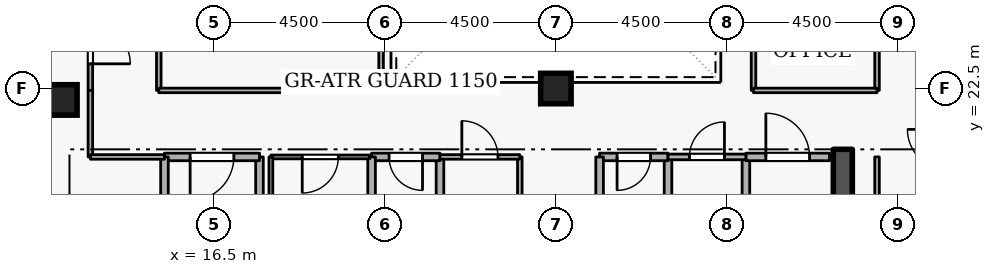
"""IFC4 building model, lengths in metres.
Left out: names, types, materials, properties, quantities, classifications, styles, units other than length and angle.
Written with IfcOpenShell. Run it as: python <this file> out.ifc"""

import sys

from ifc_helpers import new_model, si_unit, direction, frame, frame_2d, origin, origin_2d, place, context, subcontext, project, spatial, rectangle, extrude, element, fill, save


model = new_model("IFC4")
c1 = context("Model", 3, precision=1e-05, world=origin(), true_north=direction((0.0, 1.0)))
c2 = subcontext(c1, "Body", "Model", "MODEL_VIEW")
j1 = project(units=[si_unit("LENGTHUNIT", "METRE"), si_unit("PLANEANGLEUNIT", "RADIAN")], contexts=[c1])
p1 = place(None, origin())
s1 = spatial("IfcSite", under=j1, at=p1, CompositionType="ELEMENT")
p2 = place(p1, origin())
s2 = spatial("IfcBuilding", under=s1, at=p2, CompositionType="ELEMENT")
p3 = place(p2, frame((0.0, 0.0, 261.9)))
s3 = spatial("IfcBuildingStorey", under=s2, at=p3, CompositionType="ELEMENT", Elevation=261.9)
p4 = place(p3, frame((33.05, 15.1, 0.0), z_axis=(0.0, 0.0, 1.0), x_axis=(0.0, 1.0, 0.0)))
e1 = element("IfcWall", 1, at=p4, inside=s3, PredefinedType="SHEAR", context=c2, shape_type="SweptSolid", body=[
    extrude(rectangle(XDim=5.8, YDim=0.5, at=frame_2d((2.9, 0.0))), origin(), (0.0, 0.0, 1.0), 3.6),
])
for number, where, z_axis, x_axis in (
    (2, (12.5, 22.2, 0.0), (0.0, 0.0, 1.0), (1.0, 0.0, 0.0)),
    (3, (25.5, 22.5, 0.0), (0.0, 0.0, 1.0), (1.0, 0.0, 0.0)),
):
    element("IfcColumn", number, at=place(p3, frame(where, z_axis=z_axis, x_axis=x_axis)), inside=s3, PredefinedType="COLUMN", context=c2, shape_type="SweptSolid", body=[
        extrude(rectangle(XDim=0.8, YDim=0.8, at=origin_2d()), origin(), (0.0, 0.0, 1.0), 3.6),
    ])
p5 = place(p3, frame((17.7, 18.4, 0.0), z_axis=(0.0, 0.0, 1.0), x_axis=(0.0, 1.0, 0.0)))
e4 = element("IfcWall", 4, at=p5, inside=s3, PredefinedType="STANDARD", context=c2, shape_type="SweptSolid", body=[
    extrude(rectangle(XDim=2.3, YDim=0.2, at=frame_2d((1.15, 0.0))), origin(), (0.0, 0.0, 1.0), 2.545),
])
p6 = place(p3, frame((17.7, 20.7, 0.0), z_axis=(0.0, 0.0, 1.0), x_axis=(-1.0, 0.0, 0.0)))
e5 = element("IfcWall", 5, at=p6, inside=s3, PredefinedType="STANDARD", context=c2, shape_type="SweptSolid", body=[
    extrude(rectangle(XDim=2.5, YDim=0.2, at=frame_2d((1.25, 0.0))), origin(), (0.0, 0.0, 1.0), 3.34),
])
p7 = place(p6, frame((0.675, 0.0, 0.0)))
e6 = element("IfcOpeningElement", 6, at=p7, cuts=e5, PredefinedType="OPENING", context=c2, shape_type="SweptSolid", body=[
    extrude(rectangle(XDim=1.15, YDim=2.1, at=frame_2d((0.575, 1.05))), frame((0.0, 0.11, 0.0), z_axis=(0.0, -1.0, 0.0), x_axis=(1.0, 0.0, 0.0)), (0.0, 0.0, 1.0), 0.22),
])
p8 = place(p3, frame((15.2, 20.7, 0.0), z_axis=(0.0, 0.0, 1.0), x_axis=(0.0, -1.0, 0.0)))
e7 = element("IfcWall", 7, at=p8, inside=s3, PredefinedType="STANDARD", context=c2, shape_type="SweptSolid", body=[
    extrude(rectangle(XDim=5.7, YDim=0.2, at=frame_2d((2.85, 0.0))), origin(), (0.0, 0.0, 1.0), 3.34),
])
p9 = place(p3, frame((28.45, 18.65, 0.0), z_axis=(0.0, 0.0, 1.0), x_axis=(0.0, 1.0, 0.0)))
e8 = element("IfcWall", 8, at=p9, inside=s3, PredefinedType="STANDARD", context=c2, shape_type="SweptSolid", body=[
    extrude(rectangle(XDim=2.05, YDim=0.2, at=frame_2d((1.025, 0.0))), origin(), (0.0, 0.0, 1.0), 3.34),
])
p10 = place(p3, frame((28.45, 20.7, 0.0), z_axis=(0.0, 0.0, 1.0), x_axis=(-1.0, 0.0, 0.0)))
e9 = element("IfcWall", 9, at=p10, inside=s3, PredefinedType="STANDARD", context=c2, shape_type="SweptSolid", body=[
    extrude(rectangle(XDim=1.8, YDim=0.2, at=frame_2d((0.9, 0.0))), origin(), (0.0, 0.0, 1.0), 3.34),
])
p11 = place(p10, frame((0.46, 0.0, 0.0)))
e10 = element("IfcOpeningElement", 10, at=p11, cuts=e9, PredefinedType="OPENING", context=c2, shape_type="SweptSolid", body=[
    extrude(rectangle(XDim=0.88, YDim=2.04, at=frame_2d((0.44, 1.02))), frame((0.0, 0.11, 0.0), z_axis=(0.0, -1.0, 0.0), x_axis=(1.0, 0.0, 0.0)), (0.0, 0.0, 1.0), 0.22),
])
for number, where, z_axis, x_axis in (
    (11, (26.65, 20.7, 0.0), (0.0, 0.0, 1.0), (0.0, -1.0, 0.0)),
    (12, (22.45, 18.65, 0.0), (0.0, 0.0, 1.0), (0.0, 1.0, 0.0)),
):
    element("IfcWall", number, at=place(p3, frame(where, z_axis=z_axis, x_axis=x_axis)), inside=s3, PredefinedType="STANDARD", context=c2, shape_type="SweptSolid", body=[
        extrude(rectangle(XDim=2.05, YDim=0.2, at=frame_2d((1.025, 0.0))), origin(), (0.0, 0.0, 1.0), 3.34),
    ])
p12 = place(p3, frame((22.45, 20.7, 0.0), z_axis=(0.0, 0.0, 1.0), x_axis=(-1.0, 0.0, 0.0)))
e13 = element("IfcWall", 13, at=p12, inside=s3, PredefinedType="STANDARD", context=c2, shape_type="SweptSolid", body=[
    extrude(rectangle(XDim=1.8, YDim=0.2, at=frame_2d((0.9, 0.0))), origin(), (0.0, 0.0, 1.0), 3.34),
])
p13 = place(p12, frame((0.46, 0.0, 0.0)))
e14 = element("IfcOpeningElement", 14, at=p13, cuts=e13, PredefinedType="OPENING", context=c2, shape_type="SweptSolid", body=[
    extrude(rectangle(XDim=0.88, YDim=2.04, at=frame_2d((0.44, 1.02))), frame((0.0, 0.11, 0.0), z_axis=(0.0, -1.0, 0.0), x_axis=(1.0, 0.0, 0.0)), (0.0, 0.0, 1.0), 0.22),
])
for number, where, z_axis, x_axis in (
    (15, (20.65, 20.7, 0.0), (0.0, 0.0, 1.0), (0.0, -1.0, 0.0)),
    (16, (30.5, 18.65, 0.0), (0.0, 0.0, 1.0), (0.0, 1.0, 0.0)),
):
    element("IfcWall", number, at=place(p3, frame(where, z_axis=z_axis, x_axis=x_axis)), inside=s3, PredefinedType="STANDARD", context=c2, shape_type="SweptSolid", body=[
        extrude(rectangle(XDim=2.05, YDim=0.2, at=frame_2d((1.025, 0.0))), origin(), (0.0, 0.0, 1.0), 3.34),
    ])
p14 = place(p3, frame((30.5, 20.7, 0.0), z_axis=(0.0, 0.0, 1.0), x_axis=(1.0, 0.0, 0.0)))
e17 = element("IfcWall", 17, at=p14, inside=s3, PredefinedType="STANDARD", context=c2, shape_type="SweptSolid", body=[
    extrude(rectangle(XDim=2.2, YDim=0.2, at=frame_2d((1.1, 0.0))), origin(), (0.0, 0.0, 1.0), 3.34),
])
p15 = place(p14, frame((0.525, 0.0, 0.0)))
e18 = element("IfcOpeningElement", 18, at=p15, cuts=e17, PredefinedType="OPENING", context=c2, shape_type="SweptSolid", body=[
    extrude(rectangle(XDim=1.15, YDim=2.1, at=frame_2d((0.575, 1.05))), frame((0.0, 0.11, 0.0), z_axis=(0.0, -1.0, 0.0), x_axis=(1.0, 0.0, 0.0)), (0.0, 0.0, 1.0), 0.22),
])
p16 = place(p3, frame((20.6, 20.7, 0.0), z_axis=(0.0, 0.0, 1.0), x_axis=(-1.0, 0.0, 0.0)))
e19 = element("IfcWall", 19, at=p16, inside=s3, PredefinedType="PARTITIONING", context=c2, shape_type="SweptSolid", body=[
    extrude(rectangle(XDim=2.6, YDim=0.1, at=frame_2d((1.3, 0.0))), origin(), (0.0, 0.0, 1.0), 3.34),
])
p17 = place(p16, frame((0.825, 0.0, 0.0)))
e20 = element("IfcOpeningElement", 20, at=p17, cuts=e19, PredefinedType="OPENING", context=c2, shape_type="SweptSolid", body=[
    extrude(rectangle(XDim=0.95, YDim=2.1, at=frame_2d((0.475, 1.05))), frame((0.0, 0.06, 0.0), z_axis=(0.0, -1.0, 0.0), x_axis=(1.0, 0.0, 0.0)), (0.0, 0.0, 1.0), 0.12),
])
p18 = place(p3, frame((18.0, 20.7, 0.0), z_axis=(0.0, 0.0, 1.0), x_axis=(0.0, -1.0, 0.0)))
e21 = element("IfcWall", 21, at=p18, inside=s3, PredefinedType="PARTITIONING", context=c2, shape_type="SweptSolid", body=[
    extrude(rectangle(XDim=2.05, YDim=0.1, at=frame_2d((1.025, 0.0))), origin(), (0.0, 0.0, 1.0), 2.545),
])
p19 = place(p3, frame((24.55, 20.7, 0.0), z_axis=(0.0, 0.0, 1.0), x_axis=(0.0, -1.0, 0.0)))
e22 = element("IfcWall", 22, at=p19, inside=s3, PredefinedType="PARTITIONING", context=c2, shape_type="SweptSolid", body=[
    extrude(rectangle(XDim=2.05, YDim=0.12, at=frame_2d((1.025, 0.0))), origin(), (0.0, 0.0, 1.0), 3.34),
])
p20 = place(p3, frame((22.45, 20.7, 0.0), z_axis=(0.0, 0.0, 1.0), x_axis=(1.0, 0.0, 0.0)))
e23 = element("IfcWall", 23, at=p20, inside=s3, PredefinedType="PARTITIONING", context=c2, shape_type="SweptSolid", body=[
    extrude(rectangle(XDim=2.1, YDim=0.12, at=frame_2d((1.05, 0.0))), origin(), (0.0, 0.0, 1.0), 3.34),
])
p21 = place(p20, frame((0.575, 0.0, 0.0)))
e24 = element("IfcOpeningElement", 24, at=p21, cuts=e23, PredefinedType="OPENING", context=c2, shape_type="SweptSolid", body=[
    extrude(rectangle(XDim=0.95, YDim=2.1, at=frame_2d((0.475, 1.05))), frame((0.0, 0.07, 0.0), z_axis=(0.0, -1.0, 0.0), x_axis=(1.0, 0.0, 0.0)), (0.0, 0.0, 1.0), 0.14),
])
p22 = place(p3, frame((28.45, 20.7, 0.0), z_axis=(0.0, 0.0, 1.0), x_axis=(1.0, 0.0, 0.0)))
e25 = element("IfcWall", 25, at=p22, inside=s3, PredefinedType="PARTITIONING", context=c2, shape_type="SweptSolid", body=[
    extrude(rectangle(XDim=2.05, YDim=0.15, at=frame_2d((1.025, 0.0))), origin(), (0.0, 0.0, 1.0), 3.34),
])
p23 = place(p22, frame((0.565, 0.0, 0.0)))
e26 = element("IfcOpeningElement", 26, at=p23, cuts=e25, PredefinedType="OPENING", context=c2, shape_type="SweptSolid", body=[
    extrude(rectangle(XDim=0.92, YDim=2.08, at=frame_2d((0.46, 1.04))), frame((0.0, 0.085, 0.0), z_axis=(0.0, -1.0, 0.0), x_axis=(1.0, 0.0, 0.0)), (0.0, 0.0, 1.0), 0.17),
])
p24 = place(p3, frame((33.95, 20.7, 0.0), z_axis=(0.0, 0.0, 1.0), x_axis=(0.0, -1.0, 0.0)))
e27 = element("IfcWall", 27, at=p24, inside=s3, PredefinedType="PARTITIONING", context=c2, shape_type="SweptSolid", body=[
    extrude(rectangle(XDim=5.9, YDim=0.12, at=frame_2d((2.95, 0.0))), origin(), (0.0, 0.0, 1.0), 3.34),
])
p25 = place(p3, frame((13.25, 24.9, 0.0), z_axis=(0.0, 0.0, 1.0), x_axis=(0.0, -1.0, 0.0)))
e28 = element("IfcWall", 28, at=p25, inside=s3, PredefinedType="PARTITIONING", context=c2, shape_type="SweptSolid", body=[
    extrude(rectangle(XDim=2.45, YDim=0.12, at=frame_2d((1.225, 0.0))), origin(), (0.0, 0.0, 1.0), 3.34),
])
p26 = place(p25, frame((0.7, 0.0, 0.0)))
e29 = element("IfcOpeningElement", 29, at=p26, cuts=e28, PredefinedType="OPENING", context=c2, shape_type="SweptSolid", body=[
    extrude(rectangle(XDim=1.05, YDim=2.1, at=frame_2d((0.525, 1.05))), frame((0.0, 0.07, 0.0), z_axis=(0.0, -1.0, 0.0), x_axis=(1.0, 0.0, 0.0)), (0.0, 0.0, 1.0), 0.14),
])
p27 = place(p3, frame((13.25, 22.45, 0.0), z_axis=(0.0, 0.0, 1.0), x_axis=(0.0, -1.0, 0.0)))
e30 = element("IfcWall", 30, at=p27, inside=s3, PredefinedType="PARTITIONING", context=c2, shape_type="SweptSolid", body=[
    extrude(rectangle(XDim=1.75, YDim=0.12, at=frame_2d((0.875, 0.0))), origin(), (0.0, 0.0, 1.0), 3.34),
])
p28 = place(p3, frame((13.25, 20.7, 0.0), z_axis=(0.0, 0.0, 1.0), x_axis=(1.0, 0.0, 0.0)))
e31 = element("IfcWall", 31, at=p28, inside=s3, PredefinedType="PARTITIONING", context=c2, shape_type="SweptSolid", body=[
    extrude(rectangle(XDim=1.95, YDim=0.12, at=frame_2d((0.975, 0.0))), origin(), (0.0, 0.0, 1.0), 3.34),
])
p29 = place(p3, frame((15.05, 22.45, 0.0), z_axis=(0.0, 0.0, 1.0), x_axis=(0.0, 1.0, 0.0)))
e32 = element("IfcWall", 32, at=p29, inside=s3, PredefinedType="PARTITIONING", context=c2, shape_type="SweptSolid", body=[
    extrude(rectangle(XDim=9.1, YDim=0.12, at=frame_2d((4.55, 0.0))), origin(), (0.0, 0.0, 1.0), 3.34),
])
p30 = place(p29, frame((4.075, 0.0, 0.0)))
e33 = element("IfcOpeningElement", 33, at=p30, cuts=e32, PredefinedType="OPENING", context=c2, shape_type="SweptSolid", body=[
    extrude(rectangle(XDim=0.95, YDim=2.1, at=frame_2d((0.475, 1.05))), frame((0.0, 0.07, 0.0), z_axis=(0.0, -1.0, 0.0), x_axis=(1.0, 0.0, 0.0)), (0.0, 0.0, 1.0), 0.14),
])
p31 = place(p3, frame((20.9, 31.55, 0.0), z_axis=(0.0, 0.0, 1.0), x_axis=(0.0, -1.0, 0.0)))
e34 = element("IfcWall", 34, at=p31, inside=s3, PredefinedType="PARTITIONING", context=c2, shape_type="SweptSolid", body=[
    extrude(rectangle(XDim=9.1, YDim=0.12, at=frame_2d((4.55, 0.0))), origin(), (0.0, 0.0, 1.0), 3.34),
])
p32 = place(p3, frame((20.9, 22.45, 0.0), z_axis=(0.0, 0.0, 1.0), x_axis=(-1.0, 0.0, 0.0)))
e35 = element("IfcWall", 35, at=p32, inside=s3, PredefinedType="PARTITIONING", context=c2, shape_type="SweptSolid", body=[
    extrude(rectangle(XDim=5.85, YDim=0.12, at=frame_2d((2.925, 0.0))), origin(), (0.0, 0.0, 1.0), 3.34),
])
p33 = place(p3, frame((30.7, 22.45, 0.0), z_axis=(0.0, 0.0, 1.0), x_axis=(0.0, 1.0, 0.0)))
e36 = element("IfcWall", 36, at=p33, inside=s3, PredefinedType="PARTITIONING", context=c2, shape_type="SweptSolid", body=[
    extrude(rectangle(XDim=9.1, YDim=0.12, at=frame_2d((4.55, 0.0))), origin(), (0.0, 0.0, 1.0), 3.34),
])
p34 = place(p3, frame((33.95, 31.55, 0.0), z_axis=(0.0, 0.0, 1.0), x_axis=(0.0, -1.0, 0.0)))
e37 = element("IfcWall", 37, at=p34, inside=s3, PredefinedType="PARTITIONING", context=c2, shape_type="SweptSolid", body=[
    extrude(rectangle(XDim=9.1, YDim=0.12, at=frame_2d((4.55, 0.0))), origin(), (0.0, 0.0, 1.0), 3.34),
])
p35 = place(p34, frame((4.075, 0.0, 0.0)))
e38 = element("IfcOpeningElement", 38, at=p35, cuts=e37, PredefinedType="OPENING", context=c2, shape_type="SweptSolid", body=[
    extrude(rectangle(XDim=0.95, YDim=2.1, at=frame_2d((0.475, 1.05))), frame((0.0, 0.07, 0.0), z_axis=(0.0, -1.0, 0.0), x_axis=(1.0, 0.0, 0.0)), (0.0, 0.0, 1.0), 0.14),
])
p36 = place(p3, frame((33.95, 22.45, 0.0), z_axis=(0.0, 0.0, 1.0), x_axis=(-1.0, 0.0, 0.0)))
e39 = element("IfcWall", 39, at=p36, inside=s3, PredefinedType="PARTITIONING", context=c2, shape_type="SweptSolid", body=[
    extrude(rectangle(XDim=3.25, YDim=0.12, at=frame_2d((1.625, 0.0))), origin(), (0.0, 0.0, 1.0), 3.34),
])
p37 = place(p7, origin())
e40 = element("IfcDoor", 40, at=p37, inside=s3, OperationType="SINGLE_SWING_RIGHT", PredefinedType="DOOR", context=c2, shape_type="SweptSolid", body=[
    extrude(rectangle(XDim=1.15, YDim=2.1, at=frame_2d((0.575, 1.05))), frame((0.0, 0.025, 0.0), z_axis=(0.0, -1.0, 0.0), x_axis=(1.0, 0.0, 0.0)), (0.0, 0.0, 1.0), 0.05),
])
fill(e6, e40)
p38 = place(p11, origin())
e41 = element("IfcDoor", 41, at=p38, inside=s3, OperationType="SINGLE_SWING_RIGHT", PredefinedType="DOOR", context=c2, shape_type="SweptSolid", body=[
    extrude(rectangle(XDim=0.88, YDim=2.04, at=frame_2d((0.44, 1.02))), frame((0.0, 0.025, 0.0), z_axis=(0.0, -1.0, 0.0), x_axis=(1.0, 0.0, 0.0)), (0.0, 0.0, 1.0), 0.05),
])
fill(e10, e41)
p39 = place(p13, origin())
e42 = element("IfcDoor", 42, at=p39, inside=s3, OperationType="SINGLE_SWING_LEFT", PredefinedType="DOOR", context=c2, shape_type="SweptSolid", body=[
    extrude(rectangle(XDim=0.88, YDim=2.04, at=frame_2d((0.44, 1.02))), frame((0.0, 0.025, 0.0), z_axis=(0.0, -1.0, 0.0), x_axis=(1.0, 0.0, 0.0)), (0.0, 0.0, 1.0), 0.05),
])
fill(e14, e42)
p40 = place(p17, origin())
e43 = element("IfcDoor", 43, at=p40, inside=s3, OperationType="SINGLE_SWING_RIGHT", PredefinedType="DOOR", context=c2, shape_type="SweptSolid", body=[
    extrude(rectangle(XDim=0.95, YDim=2.1, at=frame_2d((0.475, 1.05))), frame((0.0, 0.025, 0.0), z_axis=(0.0, -1.0, 0.0), x_axis=(1.0, 0.0, 0.0)), (0.0, 0.0, 1.0), 0.05),
])
fill(e20, e43)
p41 = place(p21, origin())
e44 = element("IfcDoor", 44, at=p41, inside=s3, OperationType="SINGLE_SWING_LEFT", PredefinedType="DOOR", context=c2, shape_type="SweptSolid", body=[
    extrude(rectangle(XDim=0.95, YDim=2.1, at=frame_2d((0.475, 1.05))), frame((0.0, 0.025, 0.0), z_axis=(0.0, -1.0, 0.0), x_axis=(1.0, 0.0, 0.0)), (0.0, 0.0, 1.0), 0.05),
])
fill(e24, e44)
p42 = place(p23, origin())
e45 = element("IfcDoor", 45, at=p42, inside=s3, OperationType="SINGLE_SWING_RIGHT", PredefinedType="DOOR", context=c2, shape_type="SweptSolid", body=[
    extrude(rectangle(XDim=0.92, YDim=2.08, at=frame_2d((0.46, 1.04))), frame((0.0, 0.025, 0.0), z_axis=(0.0, -1.0, 0.0), x_axis=(1.0, 0.0, 0.0)), (0.0, 0.0, 1.0), 0.05),
])
fill(e26, e45)
p43 = place(p15, origin())
e46 = element("IfcDoor", 46, at=p43, inside=s3, OperationType="SINGLE_SWING_LEFT", PredefinedType="DOOR", context=c2, shape_type="SweptSolid", body=[
    extrude(rectangle(XDim=1.15, YDim=2.1, at=frame_2d((0.575, 1.05))), frame((0.0, 0.025, 0.0), z_axis=(0.0, -1.0, 0.0), x_axis=(1.0, 0.0, 0.0)), (0.0, 0.0, 1.0), 0.05),
])
fill(e18, e46)
p44 = place(p26, origin())
e47 = element("IfcDoor", 47, at=p44, inside=s3, OperationType="SINGLE_SWING_RIGHT", PredefinedType="DOOR", context=c2, shape_type="SweptSolid", body=[
    extrude(rectangle(XDim=1.05, YDim=2.1, at=frame_2d((0.525, 1.05))), frame((0.0, 0.025, 0.0), z_axis=(0.0, -1.0, 0.0), x_axis=(1.0, 0.0, 0.0)), (0.0, 0.0, 1.0), 0.05),
])
fill(e29, e47)
save(model, sys.argv[1])
